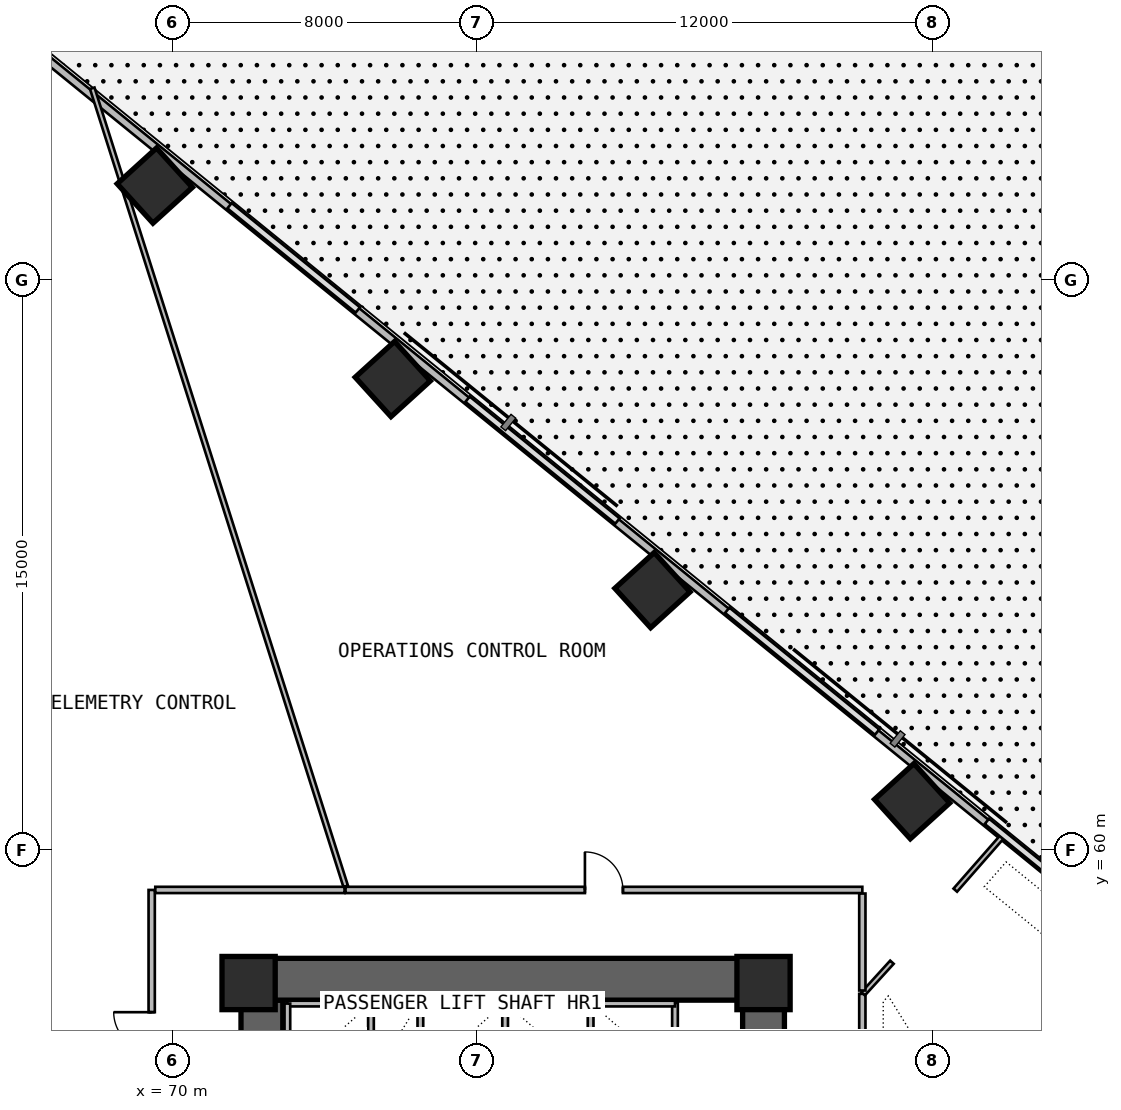
"""IFC4 building model, lengths in metres.
Left out: names, types, materials, properties, quantities, classifications, styles, units other than length and angle.
Written with IfcOpenShell. Run it as: python <this file> out.ifc"""

import sys

from ifc_helpers import new_model, si_unit, direction, frame, frame_2d, origin, origin_2d, place, context, subcontext, project, spatial, rectangle, extrude, element, fill, save


model = new_model("IFC4")
c1 = context("Model", 3, precision=1e-05, world=origin(), true_north=direction((0.0, 1.0)))
c2 = subcontext(c1, "Body", "Model", "MODEL_VIEW")
j1 = project(units=[si_unit("LENGTHUNIT", "METRE"), si_unit("PLANEANGLEUNIT", "RADIAN")], contexts=[c1])
p1 = place(None, origin())
s1 = spatial("IfcSite", under=j1, at=p1, CompositionType="ELEMENT")
p2 = place(p1, origin())
s2 = spatial("IfcBuilding", under=s1, at=p2, CompositionType="ELEMENT")
p3 = place(p2, frame((0.0, 0.0, 26.7)))
s3 = spatial("IfcBuildingStorey", under=s2, at=p3, CompositionType="ELEMENT", Elevation=26.7)
p4 = place(p3, frame((72.35, 43.35, -0.4), z_axis=(0.0, 0.0, 1.0), x_axis=(0.0, 1.0, 0.0)))
e1 = element("IfcWall", 1, at=p4, inside=s3, PredefinedType="SHEAR", context=c2, shape_type="SweptSolid", body=[
    extrude(rectangle(XDim=12.7, YDim=1.1, at=frame_2d((6.35, 0.0))), origin(), (0.0, 0.0, 1.0), 3.8),
])
p5 = place(p4, frame((1.35, 0.0, 0.4)))
e2 = element("IfcOpeningElement", 2, at=p5, cuts=e1, PredefinedType="OPENING", context=c2, shape_type="SweptSolid", body=[
    extrude(rectangle(XDim=1.2, YDim=2.2, at=frame_2d((0.6, 1.1))), frame((0.0, 0.56, 0.0), z_axis=(0.0, -1.0, 0.0), x_axis=(1.0, 0.0, 0.0)), (0.0, 0.0, 1.0), 1.12),
])
p6 = place(p3, frame((71.8, 56.6, -0.4), z_axis=(0.0, 0.0, 1.0), x_axis=(1.0, 0.0, 0.0)))
e3 = element("IfcWall", 3, at=p6, inside=s3, PredefinedType="SHEAR", context=c2, shape_type="SweptSolid", body=[
    extrude(rectangle(XDim=14.3, YDim=1.1, at=frame_2d((7.15, 0.0))), origin(), (0.0, 0.0, 1.0), 3.8),
])
p7 = place(p3, frame((85.55, 47.6, -0.4), z_axis=(0.0, 0.0, 1.0), x_axis=(0.0, 1.0, 0.0)))
e4 = element("IfcWall", 4, at=p7, inside=s3, PredefinedType="SHEAR", context=c2, shape_type="SweptSolid", body=[
    extrude(rectangle(XDim=8.45, YDim=1.1, at=frame_2d((4.225, 0.0))), origin(), (0.0, 0.0, 1.0), 3.8),
])
for number, where, z_axis, x_axis in (
    (5, (72.0, 56.5, 0.0), (0.0, 0.0, 1.0), (1.0, 0.0, 0.0)),
    (6, (85.55, 56.5, 0.0), (0.0, 0.0, 1.0), (1.0, 0.0, 0.0)),
    (7, (89.46, 61.285, 0.0), (0.0, 0.0, 1.0), (0.74, 0.672, 0.0)),
    (8, (82.627, 66.839, 0.0), (0.0, 0.0, 1.0), (0.74, 0.672, 0.0)),
    (9, (75.794, 72.392, 0.0), (0.0, 0.0, 1.0), (0.74, 0.672, 0.0)),
):
    element("IfcColumn", number, at=place(p3, frame(where, z_axis=z_axis, x_axis=x_axis)), inside=s3, PredefinedType="COLUMN", context=c2, shape_type="SweptSolid", body=[
        extrude(rectangle(XDim=1.4, YDim=1.4, at=origin_2d()), origin(), (0.0, 0.0, 1.0), 3.6),
    ])
p8 = place(p3, frame((69.531, 77.483, -0.4), z_axis=(0.0, 0.0, 1.0), x_axis=(0.740218127487, 0.672366807435, 0.0)))
e10 = element("IfcColumn", 10, at=p8, inside=s3, PredefinedType="COLUMN", context=c2, shape_type="SweptSolid", body=[
    extrude(rectangle(XDim=1.4, YDim=1.4, at=origin_2d()), origin(), (0.0, 0.0, 1.0), 4.0),
])
p9 = place(p3, frame((94.513, 58.196, 0.0), z_axis=(0.0, 0.0, 1.0), x_axis=(-0.776001602097, 0.630730935933, 0.0)))
e11 = element("IfcWall", 11, at=p9, inside=s3, PredefinedType="PARAPET", context=c2, shape_type="SweptSolid", body=[
    extrude(rectangle(XDim=36.148, YDim=0.2, at=frame_2d((18.074, 0.0))), origin(), (0.0, 0.0, 1.0), 1.15),
])
p10 = place(p3, frame((73.02, 55.96, 0.0), z_axis=(0.0, 0.0, 1.0), x_axis=(1.0, 0.0, 0.0)))
e12 = element("IfcWall", 12, at=p10, inside=s3, PredefinedType="SOLIDWALL", context=c2, shape_type="SweptSolid", body=[
    extrude(rectangle(XDim=3.5, YDim=0.15, at=frame_2d((1.75, 0.0))), origin(), (0.0, 0.0, 1.0), 3.4),
])
p11 = place(p3, frame((73.02, 54.02, 0.0), z_axis=(0.0, 0.0, 1.0), x_axis=(0.0, 1.0, 0.0)))
e13 = element("IfcWall", 13, at=p11, inside=s3, PredefinedType="PLUMBINGWALL", context=c2, shape_type="SweptSolid", body=[
    extrude(rectangle(XDim=1.94, YDim=0.15, at=frame_2d((0.97, 0.0))), origin(), (0.0, 0.0, 1.0), 3.4),
])
p12 = place(p3, frame((76.52, 54.02, 0.0), z_axis=(0.0, 0.0, 1.0), x_axis=(0.0, 1.0, 0.0)))
e14 = element("IfcWall", 14, at=p12, inside=s3, PredefinedType="SOLIDWALL", context=c2, shape_type="SweptSolid", body=[
    extrude(rectangle(XDim=1.94, YDim=0.15, at=frame_2d((0.97, 0.0))), origin(), (0.0, 0.0, 1.0), 3.4),
])
p13 = place(p3, frame((75.22, 54.02, 0.0), z_axis=(0.0, 0.0, 1.0), x_axis=(0.0, 1.0, 0.0)))
e15 = element("IfcWall", 15, at=p13, inside=s3, PredefinedType="PLUMBINGWALL", context=c2, shape_type="SweptSolid", body=[
    extrude(rectangle(XDim=1.94, YDim=0.15, at=frame_2d((0.97, 0.0))), origin(), (0.0, 0.0, 1.0), 3.4),
])
for number, where, z_axis, x_axis in (
    (16, (78.75, 54.02, 0.0), (0.0, 0.0, 1.0), (0.0, 1.0, 0.0)),
    (17, (81.0, 54.02, 0.0), (0.0, 0.0, 1.0), (0.0, 1.0, 0.0)),
):
    element("IfcWall", number, at=place(p3, frame(where, z_axis=z_axis, x_axis=x_axis)), inside=s3, PredefinedType="PLUMBINGWALL", context=c2, shape_type="SweptSolid", body=[
        extrude(rectangle(XDim=1.96, YDim=0.15, at=frame_2d((0.98, 0.0))), origin(), (0.0, 0.0, 1.0), 3.4),
    ])
p14 = place(p3, frame((83.22, 54.02, 0.0), z_axis=(0.0, 0.0, 1.0), x_axis=(0.0, 1.0, 0.0)))
e18 = element("IfcWall", 18, at=p14, inside=s3, PredefinedType="SOLIDWALL", context=c2, shape_type="SweptSolid", body=[
    extrude(rectangle(XDim=1.96, YDim=0.15, at=frame_2d((0.98, 0.0))), origin(), (0.0, 0.0, 1.0), 3.4),
])
p15 = place(p3, frame((76.52, 55.96, 0.0), z_axis=(0.0, 0.0, 1.0), x_axis=(1.0, 0.0, 0.0)))
e19 = element("IfcWall", 19, at=p15, inside=s3, PredefinedType="SOLIDWALL", context=c2, shape_type="SweptSolid", body=[
    extrude(rectangle(XDim=6.7, YDim=0.15, at=frame_2d((3.35, 0.0))), origin(), (0.0, 0.0, 1.0), 3.4),
])
p16 = place(p3, frame((88.15, 43.905, 0.0), z_axis=(0.0, 0.0, 1.0), x_axis=(0.0, 1.0, 0.0)))
e20 = element("IfcWall", 20, at=p16, inside=s3, PredefinedType="PARTITIONING", context=c2, shape_type="SweptSolid", body=[
    extrude(rectangle(XDim=12.312, YDim=0.165, at=frame_2d((6.156, 0.0))), origin(), (0.0, 0.0, 1.0), 2.785),
])
p17 = place(p16, frame((2.601, 0.0, 0.0)))
e21 = element("IfcOpeningElement", 21, at=p17, cuts=e20, PredefinedType="OPENING", context=c2, shape_type="SweptSolid", body=[
    extrude(rectangle(XDim=1.0, YDim=2.2, at=frame_2d((0.5, 1.1))), frame((0.0, 0.093, 0.0), z_axis=(0.0, -1.0, 0.0), x_axis=(1.0, 0.0, 0.0)), (0.0, 0.0, 1.0), 0.185),
])
p18 = place(p3, frame((90.596, 58.944, 0.0), z_axis=(0.0, 0.0, 1.0), x_axis=(0.659102632296, 0.752053003518, 0.0)))
e22 = element("IfcWall", 22, at=p18, inside=s3, PredefinedType="PARTITIONING", context=c2, shape_type="SweptSolid", body=[
    extrude(rectangle(XDim=2.051, YDim=0.125, at=frame_2d((1.026, 0.0))), origin(), (0.0, 0.0, 1.0), 2.785),
])
p19 = place(p3, frame((88.171, 56.217, 0.0), z_axis=(0.0, 0.0, 1.0), x_axis=(0.673579579933, 0.739114706589, 0.0)))
e23 = element("IfcWall", 23, at=p19, inside=s3, PredefinedType="PARTITIONING", context=c2, shape_type="SweptSolid", body=[
    extrude(rectangle(XDim=1.125, YDim=0.125, at=frame_2d((0.562, 0.0))), origin(), (0.0, 0.0, 1.0), 3.4),
])
p20 = place(p3, frame((88.15, 58.95, 0.0), z_axis=(0.0, 0.0, 1.0), x_axis=(-1.0, 0.0, 0.0)))
e24 = element("IfcWall", 24, at=p20, inside=s3, PredefinedType="PARTITIONING", context=c2, shape_type="SweptSolid", body=[
    extrude(rectangle(XDim=13.6, YDim=0.165, at=frame_2d((6.8, 0.0))), origin(), (0.0, 0.0, 1.0), 2.785),
])
p21 = place(p20, frame((6.3, 0.0, 0.0)))
e25 = element("IfcOpeningElement", 25, at=p21, cuts=e24, PredefinedType="OPENING", context=c2, shape_type="SweptSolid", body=[
    extrude(rectangle(XDim=1.0, YDim=2.2, at=frame_2d((0.5, 1.1))), frame((0.0, 0.093, 0.0), z_axis=(0.0, -1.0, 0.0), x_axis=(1.0, 0.0, 0.0)), (0.0, 0.0, 1.0), 0.185),
])
p22 = place(p3, frame((88.15, 56.304, 0.0), z_axis=(0.0, 0.0, 1.0), x_axis=(0.0, 1.0, 0.0)))
e26 = element("IfcWall", 26, at=p22, inside=s3, PredefinedType="PARTITIONING", context=c2, shape_type="SweptSolid", body=[
    extrude(rectangle(XDim=2.552, YDim=0.165, at=frame_2d((1.276, 0.0))), origin(), (0.0, 0.0, 1.0), 3.4),
])
p23 = place(p3, frame((74.555, 59.044, 0.0), z_axis=(0.0, 0.0, 1.0), x_axis=(-0.302696882348, 0.95308687821, 0.0)))
e27 = element("IfcWall", 27, at=p23, inside=s3, PredefinedType="PARTITIONING", context=c2, shape_type="SweptSolid", body=[
    extrude(rectangle(XDim=22.034, YDim=0.125, at=frame_2d((11.017, 0.0))), origin(), (0.0, 0.0, 1.0), 2.785),
])
p24 = place(p3, frame((69.45, 58.95, 0.0), z_axis=(0.0, 0.0, 1.0), x_axis=(0.0, -1.0, 0.0)))
e28 = element("IfcWall", 28, at=p24, inside=s3, PredefinedType="PARTITIONING", context=c2, shape_type="SweptSolid", body=[
    extrude(rectangle(XDim=7.433, YDim=0.165, at=frame_2d((3.717, 0.0))), origin(), (0.0, 0.0, 1.0), 2.785),
])
p25 = place(p24, frame((3.217, 0.0, 0.0)))
e29 = element("IfcOpeningElement", 29, at=p25, cuts=e28, PredefinedType="OPENING", context=c2, shape_type="SweptSolid", body=[
    extrude(rectangle(XDim=1.0, YDim=2.2, at=frame_2d((0.5, 1.1))), frame((0.0, 0.093, 0.0), z_axis=(0.0, -1.0, 0.0), x_axis=(1.0, 0.0, 0.0)), (0.0, 0.0, 1.0), 0.185),
])
p26 = place(p3, frame((74.525, 58.95, 0.0), z_axis=(0.0, 0.0, 1.0), x_axis=(-1.0, 0.0, 0.0)))
e30 = element("IfcWall", 30, at=p26, inside=s3, PredefinedType="PARTITIONING", context=c2, shape_type="SweptSolid", body=[
    extrude(rectangle(XDim=4.98, YDim=0.165, at=frame_2d((2.49, 0.0))), origin(), (0.0, 0.0, 1.0), 2.785),
])
p27 = place(p3, frame((69.355, 51.618, 0.0), z_axis=(0.0, 0.0, 1.0), x_axis=(-0.848537287103, 0.529135589803, 0.0)))
e31 = element("IfcWall", 31, at=p27, inside=s3, PredefinedType="PARTITIONING", context=c2, shape_type="SweptSolid", body=[
    extrude(rectangle(XDim=8.442, YDim=0.125, at=frame_2d((4.221, 0.0))), origin(), (0.0, 0.0, 1.0), 2.385),
])
p28 = place(p21, frame((1.0, 0.0, 0.0), z_axis=(0.0, 0.0, 1.0), x_axis=(-1.0, 0.0, 0.0)))
e32 = element("IfcDoor", 32, at=p28, inside=s3, OperationType="SINGLE_SWING_LEFT", PredefinedType="DOOR", context=c2, shape_type="SweptSolid", body=[
    extrude(rectangle(XDim=1.0, YDim=2.2, at=frame_2d((0.5, 1.1))), frame((0.0, 0.025, 0.0), z_axis=(0.0, -1.0, 0.0), x_axis=(1.0, 0.0, 0.0)), (0.0, 0.0, 1.0), 0.05),
])
fill(e25, e32)
p29 = place(p25, frame((1.0, 0.0, 0.0), z_axis=(0.0, 0.0, 1.0), x_axis=(-1.0, 0.0, 0.0)))
e33 = element("IfcDoor", 33, at=p29, inside=s3, OperationType="SINGLE_SWING_RIGHT", PredefinedType="DOOR", context=c2, shape_type="SweptSolid", body=[
    extrude(rectangle(XDim=1.0, YDim=2.2, at=frame_2d((0.5, 1.1))), frame((0.0, 0.025, 0.0), z_axis=(0.0, -1.0, 0.0), x_axis=(1.0, 0.0, 0.0)), (0.0, 0.0, 1.0), 0.05),
])
fill(e29, e33)
save(model, sys.argv[1])
